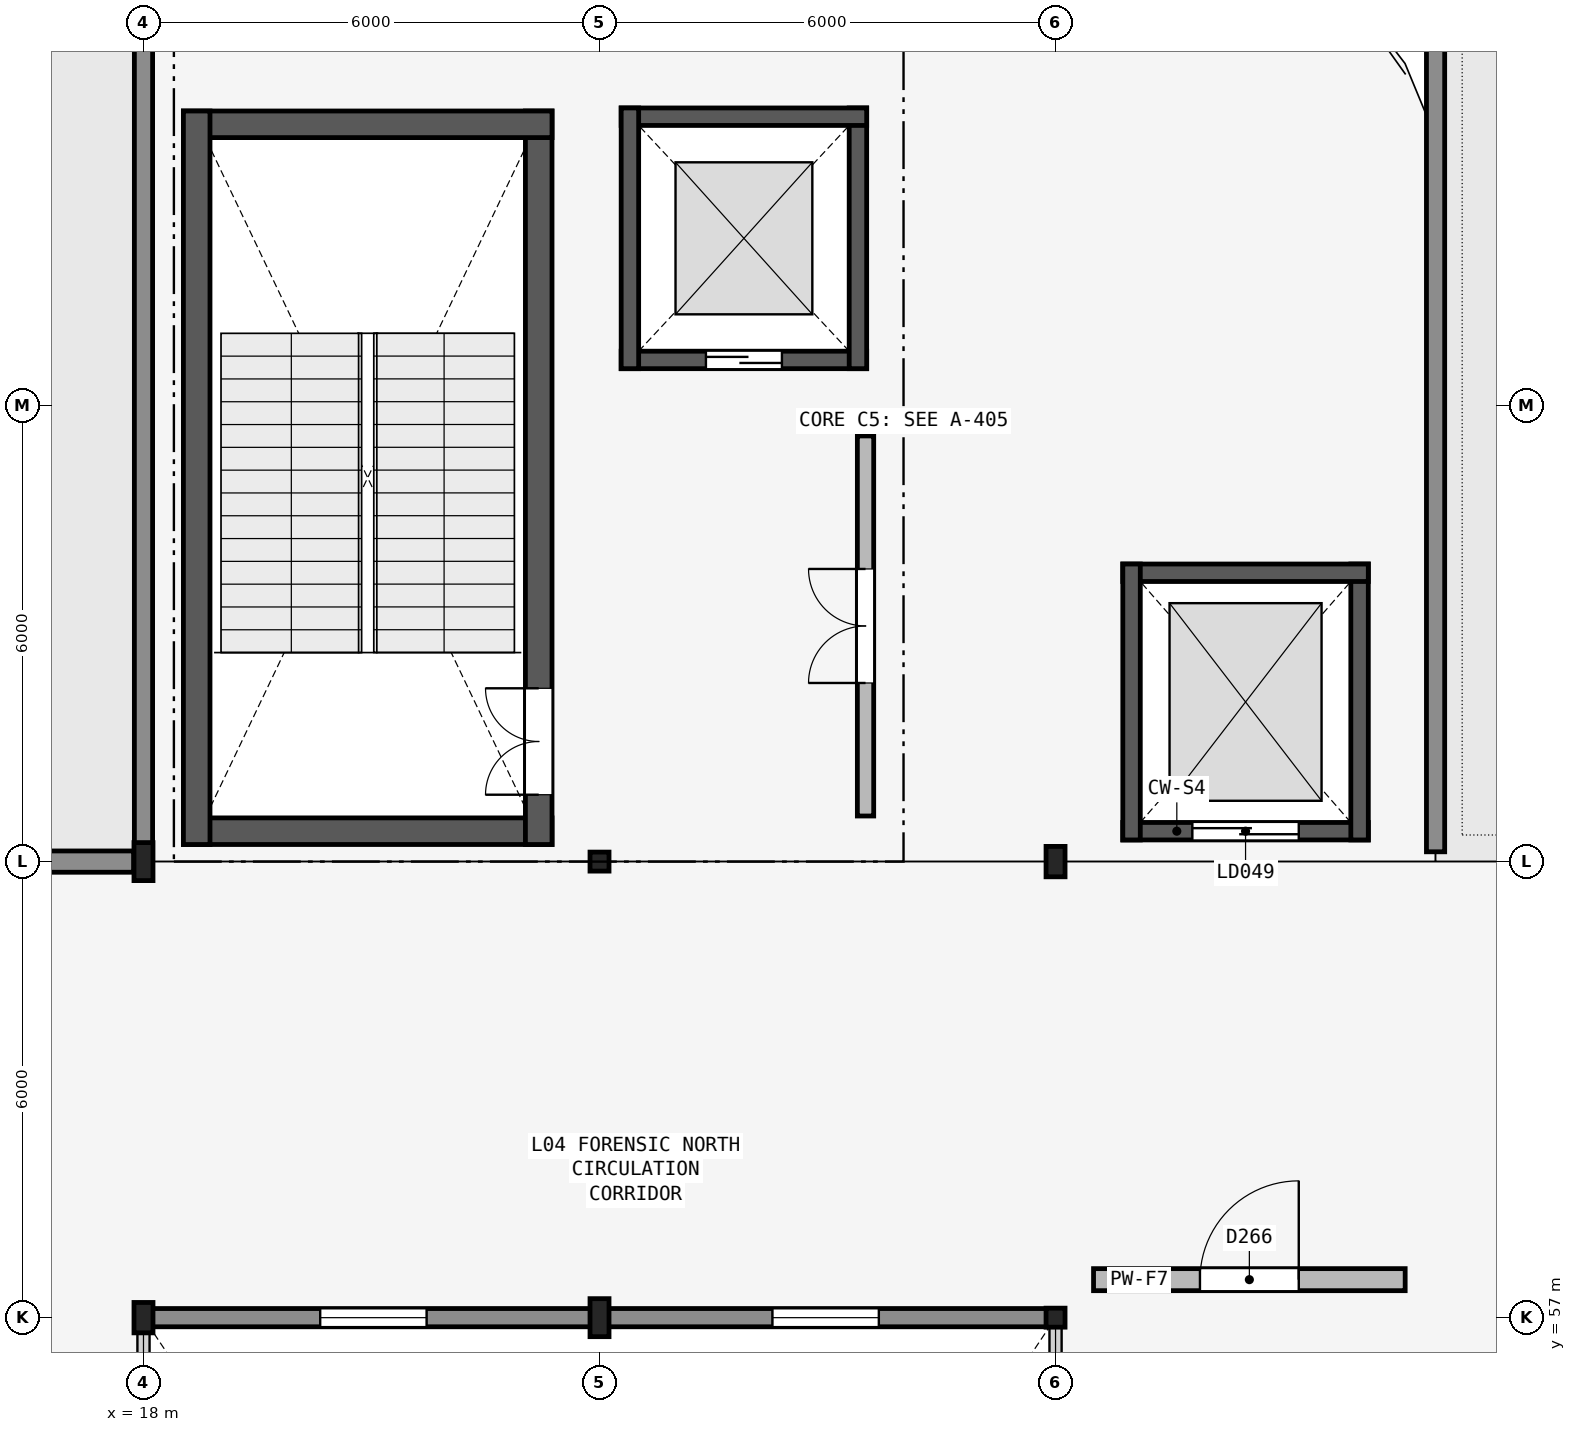
"""IFC4 building model, lengths in metres.
Left out: names, types, materials, properties, quantities, classifications, styles, units other than length and angle.
Written with IfcOpenShell. Run it as: python <this file> out.ifc"""

import sys

from ifc_helpers import new_model, si_unit, direction, frame, frame_2d, origin, origin_2d, place, context, subcontext, project, spatial, rectangle, hollow_rectangle, i_section, extrude, element, fill, save


model = new_model("IFC4")
c1 = context("Model", 3, precision=1e-05, world=origin(), true_north=direction((0.0, 1.0)))
c2 = subcontext(c1, "Body", "Model", "MODEL_VIEW")
j1 = project(units=[si_unit("LENGTHUNIT", "METRE"), si_unit("PLANEANGLEUNIT", "RADIAN")], contexts=[c1])
p1 = place(None, origin())
s1 = spatial("IfcSite", under=j1, at=p1, CompositionType="ELEMENT")
p2 = place(p1, origin())
s2 = spatial("IfcBuilding", under=s1, at=p2, CompositionType="ELEMENT")
p3 = place(p2, frame((0.0, 0.0, 18.0)))
s3 = spatial("IfcBuildingStorey", under=s2, at=p3, CompositionType="ELEMENT", Elevation=18.0)
p4 = place(p3, frame((18.0, 57.0, 0.0), z_axis=(0.0, 0.0, 1.0), x_axis=(1.0, 0.0, 0.0)))
e1 = element("IfcColumn", 1, at=p4, inside=s3, PredefinedType="COLUMN", context=c2, shape_type="SweptSolid", body=[
    extrude(i_section(OverallWidth=0.25, OverallDepth=0.4, WebThickness=0.01, FlangeThickness=0.013, FilletRadius=0.014, at=origin_2d()), origin(), (0.0, 0.0, 1.0), 4.2),
])
for number, where, z_axis, x_axis in (
    (2, (18.0, 63.0, 0.0), (0.0, 0.0, 1.0), (1.0, 0.0, 0.0)),
    (3, (24.0, 57.0, 0.0), (0.0, 0.0, 1.0), (1.0, 0.0, 0.0)),
):
    element("IfcColumn", number, at=place(p3, frame(where, z_axis=z_axis, x_axis=x_axis)), inside=s3, PredefinedType="COLUMN", context=c2, shape_type="SweptSolid", body=[
        extrude(i_section(OverallWidth=0.25, OverallDepth=0.5, WebThickness=0.01, FlangeThickness=0.015, FilletRadius=0.015, at=origin_2d()), origin(), (0.0, 0.0, 1.0), 4.2),
    ])
for number, where, z_axis, x_axis in (
    (4, (24.0, 63.0, 0.0), (0.0, 0.0, 1.0), (1.0, 0.0, 0.0)),
    (5, (30.0, 57.0, 0.0), (0.0, 0.0, 1.0), (1.0, 0.0, 0.0)),
):
    element("IfcColumn", number, at=place(p3, frame(where, z_axis=z_axis, x_axis=x_axis)), inside=s3, PredefinedType="COLUMN", context=c2, shape_type="SweptSolid", body=[
        extrude(hollow_rectangle(XDim=0.25, YDim=0.25, WallThickness=0.012, InnerFilletRadius=0.012, OuterFilletRadius=0.024, at=origin_2d()), origin(), (0.0, 0.0, 1.0), 4.2),
    ])
p5 = place(p3, frame((30.0, 63.0, 0.0), z_axis=(0.0, 0.0, 1.0), x_axis=(1.0, 0.0, 0.0)))
e6 = element("IfcColumn", 6, at=p5, inside=s3, PredefinedType="COLUMN", context=c2, shape_type="SweptSolid", body=[
    extrude(i_section(OverallWidth=0.25, OverallDepth=0.4, WebThickness=0.01, FlangeThickness=0.013, FilletRadius=0.014, at=origin_2d()), origin(), (0.0, 0.0, 1.0), 4.2),
])
p6 = place(p3, frame((12.129, 63.0, 0.0), z_axis=(0.0, 0.0, 1.0), x_axis=(1.0, 0.0, 0.0)))
e7 = element("IfcWall", 7, at=p6, inside=s3, PredefinedType="SOLIDWALL", context=c2, shape_type="SweptSolid", body=[
    extrude(rectangle(XDim=5.742, YDim=0.28, at=frame_2d((2.871, 0.0))), origin(), (0.0, 0.0, 1.0), 3.29),
])
p7 = place(p6, frame((1.971, 0.0, 0.0)))
e8 = element("IfcOpeningElement", 8, at=p7, cuts=e7, PredefinedType="OPENING", context=c2, shape_type="SweptSolid", body=[
    extrude(rectangle(XDim=1.8, YDim=2.3, at=frame_2d((0.9, 1.15))), frame((0.0, 0.15, 0.0), z_axis=(0.0, -1.0, 0.0), x_axis=(1.0, 0.0, 0.0)), (0.0, 0.0, 1.0), 0.3),
])
p8 = place(p3, frame((18.05, 57.0, 0.0), z_axis=(0.0, 0.0, 1.0), x_axis=(1.0, 0.0, 0.0)))
e9 = element("IfcWall", 9, at=p8, inside=s3, PredefinedType="SOLIDWALL", context=c2, shape_type="SweptSolid", body=[
    extrude(rectangle(XDim=5.95, YDim=0.24, at=frame_2d((2.975, 0.0))), origin(), (0.0, 0.0, 1.0), 3.29),
])
p9 = place(p8, frame((2.275, 0.0, 0.85)))
e10 = element("IfcOpeningElement", 10, at=p9, cuts=e9, PredefinedType="OPENING", context=c2, shape_type="SweptSolid", body=[
    extrude(rectangle(XDim=1.4, YDim=1.8, at=frame_2d((0.7, 0.9))), frame((0.0, 0.13, 0.0), z_axis=(0.0, -1.0, 0.0), x_axis=(1.0, 0.0, 0.0)), (0.0, 0.0, 1.0), 0.26),
])
p10 = place(p3, frame((24.0, 57.0, 0.0), z_axis=(0.0, 0.0, 1.0), x_axis=(1.0, 0.0, 0.0)))
e11 = element("IfcWall", 11, at=p10, inside=s3, PredefinedType="SOLIDWALL", context=c2, shape_type="SweptSolid", body=[
    extrude(rectangle(XDim=5.95, YDim=0.24, at=frame_2d((2.975, 0.0))), origin(), (0.0, 0.0, 1.0), 3.29),
])
p11 = place(p10, frame((2.275, 0.0, 0.85)))
e12 = element("IfcOpeningElement", 12, at=p11, cuts=e11, PredefinedType="OPENING", context=c2, shape_type="SweptSolid", body=[
    extrude(rectangle(XDim=1.4, YDim=1.8, at=frame_2d((0.7, 0.9))), frame((0.0, 0.13, 0.0), z_axis=(0.0, -1.0, 0.0), x_axis=(1.0, 0.0, 0.0)), (0.0, 0.0, 1.0), 0.26),
])
p12 = place(p3, frame((35.0, 63.129, 0.0), z_axis=(0.0, 0.0, 1.0), x_axis=(0.0, 1.0, 0.0)))
e13 = element("IfcWall", 13, at=p12, inside=s3, PredefinedType="SOLIDWALL", context=c2, shape_type="SweptSolid", body=[
    extrude(rectangle(XDim=11.746, YDim=0.24, at=frame_2d((5.873, 0.0))), origin(), (0.0, 0.0, 1.0), 3.44),
])
p13 = place(p3, frame((18.0, 63.129, 0.0), z_axis=(0.0, 0.0, 1.0), x_axis=(0.0, 1.0, 0.0)))
e14 = element("IfcWall", 14, at=p13, inside=s3, PredefinedType="SOLIDWALL", context=c2, shape_type="SweptSolid", body=[
    extrude(rectangle(XDim=11.746, YDim=0.24, at=frame_2d((5.873, 0.0))), origin(), (0.0, 0.0, 1.0), 3.29),
])
p14 = place(p3, frame((18.525, 63.4, 0.0), z_axis=(0.0, 0.0, 1.0), x_axis=(1.0, 0.0, 0.0)))
e15 = element("IfcWall", 15, at=p14, inside=s3, PredefinedType="SHEAR", context=c2, shape_type="SweptSolid", body=[
    extrude(rectangle(XDim=4.85, YDim=0.35, at=frame_2d((2.425, 0.0))), origin(), (0.0, 0.0, 1.0), 4.06),
])
p15 = place(p3, frame((23.2, 63.225, 0.0), z_axis=(0.0, 0.0, 1.0), x_axis=(0.0, 1.0, 0.0)))
e16 = element("IfcWall", 16, at=p15, inside=s3, PredefinedType="SHEAR", context=c2, shape_type="SweptSolid", body=[
    extrude(rectangle(XDim=9.65, YDim=0.35, at=frame_2d((4.825, 0.0))), origin(), (0.0, 0.0, 1.0), 4.06),
])
p16 = place(p15, frame((0.655, 0.0, 0.0)))
e17 = element("IfcOpeningElement", 17, at=p16, cuts=e16, PredefinedType="OPENING", context=c2, shape_type="SweptSolid", body=[
    extrude(rectangle(XDim=1.4, YDim=2.2, at=frame_2d((0.7, 1.1))), frame((0.0, 0.185, 0.0), z_axis=(0.0, -1.0, 0.0), x_axis=(1.0, 0.0, 0.0)), (0.0, 0.0, 1.0), 0.37),
])
p17 = place(p3, frame((23.375, 72.7, 0.0), z_axis=(0.0, 0.0, 1.0), x_axis=(-1.0, 0.0, 0.0)))
e18 = element("IfcWall", 18, at=p17, inside=s3, PredefinedType="SHEAR", context=c2, shape_type="SweptSolid", body=[
    extrude(rectangle(XDim=4.85, YDim=0.35, at=frame_2d((2.425, 0.0))), origin(), (0.0, 0.0, 1.0), 4.06),
])
p18 = place(p3, frame((18.7, 72.875, 0.0), z_axis=(0.0, 0.0, 1.0), x_axis=(0.0, -1.0, 0.0)))
e19 = element("IfcWall", 19, at=p18, inside=s3, PredefinedType="SHEAR", context=c2, shape_type="SweptSolid", body=[
    extrude(rectangle(XDim=9.65, YDim=0.35, at=frame_2d((4.825, 0.0))), origin(), (0.0, 0.0, 1.0), 4.06),
])
p19 = place(p3, frame((27.5, 63.6, 0.0), z_axis=(0.0, 0.0, 1.0), x_axis=(0.0, 1.0, 0.0)))
e20 = element("IfcWall", 20, at=p19, inside=s3, PredefinedType="PARTITIONING", context=c2, shape_type="SweptSolid", body=[
    extrude(rectangle(XDim=5.0, YDim=0.215, at=frame_2d((2.5, 0.0))), origin(), (0.0, 0.0, 1.0), 3.89),
])
p20 = place(p19, frame((1.75, 0.0, 0.0)))
e21 = element("IfcOpeningElement", 21, at=p20, cuts=e20, PredefinedType="OPENING", context=c2, shape_type="SweptSolid", body=[
    extrude(rectangle(XDim=1.5, YDim=2.15, at=frame_2d((0.75, 1.075))), frame((0.0, 0.117, 0.0), z_axis=(0.0, -1.0, 0.0), x_axis=(1.0, 0.0, 0.0)), (0.0, 0.0, 1.0), 0.235),
])
p21 = place(p3, frame((24.285, 69.6, 0.0), z_axis=(0.0, 0.0, 1.0), x_axis=(1.0, 0.0, 0.0)))
e22 = element("IfcWall", 22, at=p21, inside=s3, PredefinedType="SHEAR", context=c2, shape_type="SweptSolid", body=[
    extrude(rectangle(XDim=3.23, YDim=0.23, at=frame_2d((1.615, 0.0))), origin(), (0.0, 0.0, 1.0), 4.2),
])
p22 = place(p21, frame((1.115, 0.0, 0.0)))
e23 = element("IfcOpeningElement", 23, at=p22, cuts=e22, PredefinedType="OPENING", context=c2, shape_type="SweptSolid", body=[
    extrude(rectangle(XDim=1.0, YDim=2.15, at=frame_2d((0.5, 1.075))), frame((0.0, 0.125, 0.0), z_axis=(0.0, -1.0, 0.0), x_axis=(1.0, 0.0, 0.0)), (0.0, 0.0, 1.0), 0.25),
])
p23 = place(p3, frame((27.4, 69.485, 0.0), z_axis=(0.0, 0.0, 1.0), x_axis=(0.0, 1.0, 0.0)))
e24 = element("IfcWall", 24, at=p23, inside=s3, PredefinedType="SHEAR", context=c2, shape_type="SweptSolid", body=[
    extrude(rectangle(XDim=3.43, YDim=0.23, at=frame_2d((1.715, 0.0))), origin(), (0.0, 0.0, 1.0), 4.2),
])
p24 = place(p3, frame((27.515, 72.8, 0.0), z_axis=(0.0, 0.0, 1.0), x_axis=(-1.0, 0.0, 0.0)))
e25 = element("IfcWall", 25, at=p24, inside=s3, PredefinedType="SHEAR", context=c2, shape_type="SweptSolid", body=[
    extrude(rectangle(XDim=3.23, YDim=0.23, at=frame_2d((1.615, 0.0))), origin(), (0.0, 0.0, 1.0), 4.2),
])
p25 = place(p3, frame((24.4, 72.915, 0.0), z_axis=(0.0, 0.0, 1.0), x_axis=(0.0, -1.0, 0.0)))
e26 = element("IfcWall", 26, at=p25, inside=s3, PredefinedType="SHEAR", context=c2, shape_type="SweptSolid", body=[
    extrude(rectangle(XDim=3.43, YDim=0.23, at=frame_2d((1.715, 0.0))), origin(), (0.0, 0.0, 1.0), 4.2),
])
p26 = place(p3, frame((30.885, 63.4, 0.0), z_axis=(0.0, 0.0, 1.0), x_axis=(1.0, 0.0, 0.0)))
e27 = element("IfcWall", 27, at=p26, inside=s3, PredefinedType="SHEAR", context=c2, shape_type="SweptSolid", body=[
    extrude(rectangle(XDim=3.23, YDim=0.23, at=frame_2d((1.615, 0.0))), origin(), (0.0, 0.0, 1.0), 4.2),
])
p27 = place(p26, frame((0.915, 0.0, 0.0)))
e28 = element("IfcOpeningElement", 28, at=p27, cuts=e27, PredefinedType="OPENING", context=c2, shape_type="SweptSolid", body=[
    extrude(rectangle(XDim=1.4, YDim=2.3, at=frame_2d((0.7, 1.15))), frame((0.0, 0.125, 0.0), z_axis=(0.0, -1.0, 0.0), x_axis=(1.0, 0.0, 0.0)), (0.0, 0.0, 1.0), 0.25),
])
p28 = place(p3, frame((34.0, 63.285, 0.0), z_axis=(0.0, 0.0, 1.0), x_axis=(0.0, 1.0, 0.0)))
e29 = element("IfcWall", 29, at=p28, inside=s3, PredefinedType="SHEAR", context=c2, shape_type="SweptSolid", body=[
    extrude(rectangle(XDim=3.63, YDim=0.23, at=frame_2d((1.815, 0.0))), origin(), (0.0, 0.0, 1.0), 4.2),
])
p29 = place(p3, frame((34.115, 66.8, 0.0), z_axis=(0.0, 0.0, 1.0), x_axis=(-1.0, 0.0, 0.0)))
e30 = element("IfcWall", 30, at=p29, inside=s3, PredefinedType="SHEAR", context=c2, shape_type="SweptSolid", body=[
    extrude(rectangle(XDim=3.23, YDim=0.23, at=frame_2d((1.615, 0.0))), origin(), (0.0, 0.0, 1.0), 4.2),
])
p30 = place(p3, frame((31.0, 66.915, 0.0), z_axis=(0.0, 0.0, 1.0), x_axis=(0.0, -1.0, 0.0)))
e31 = element("IfcWall", 31, at=p30, inside=s3, PredefinedType="SHEAR", context=c2, shape_type="SweptSolid", body=[
    extrude(rectangle(XDim=3.63, YDim=0.23, at=frame_2d((1.815, 0.0))), origin(), (0.0, 0.0, 1.0), 4.2),
])
p31 = place(p3, frame((30.5, 57.5, 0.0), z_axis=(0.0, 0.0, 1.0), x_axis=(1.0, 0.0, 0.0)))
e32 = element("IfcWall", 32, at=p31, inside=s3, PredefinedType="PARTITIONING", context=c2, shape_type="SweptSolid", body=[
    extrude(rectangle(XDim=4.1, YDim=0.29, at=frame_2d((2.05, 0.0))), origin(), (0.0, 0.0, 1.0), 3.54),
])
p32 = place(p31, frame((1.4, 0.0, 0.0)))
e33 = element("IfcOpeningElement", 33, at=p32, cuts=e32, PredefinedType="OPENING", context=c2, shape_type="SweptSolid", body=[
    extrude(rectangle(XDim=1.3, YDim=2.2, at=frame_2d((0.65, 1.1))), frame((0.0, 0.155, 0.0), z_axis=(0.0, -1.0, 0.0), x_axis=(1.0, 0.0, 0.0)), (0.0, 0.0, 1.0), 0.31),
])
p33 = place(p9, origin())
e34 = element("IfcWindow", 34, at=p33, inside=s3, PartitioningType="SINGLE_PANEL", PredefinedType="WINDOW", context=c2, shape_type="SweptSolid", body=[
    extrude(rectangle(XDim=1.4, YDim=1.8, at=frame_2d((0.7, 0.9))), frame((0.0, 0.03, 0.0), z_axis=(0.0, -1.0, 0.0), x_axis=(1.0, 0.0, 0.0)), (0.0, 0.0, 1.0), 0.06),
])
fill(e10, e34)
p34 = place(p11, origin())
e35 = element("IfcWindow", 35, at=p34, inside=s3, PartitioningType="SINGLE_PANEL", PredefinedType="WINDOW", context=c2, shape_type="SweptSolid", body=[
    extrude(rectangle(XDim=1.4, YDim=1.8, at=frame_2d((0.7, 0.9))), frame((0.0, 0.03, 0.0), z_axis=(0.0, -1.0, 0.0), x_axis=(1.0, 0.0, 0.0)), (0.0, 0.0, 1.0), 0.06),
])
fill(e12, e35)
p35 = place(p16, origin())
e36 = element("IfcDoor", 36, at=p35, inside=s3, OperationType="DOUBLE_DOOR_SINGLE_SWING", PredefinedType="DOOR", context=c2, shape_type="SweptSolid", body=[
    extrude(rectangle(XDim=1.4, YDim=2.2, at=frame_2d((0.7, 1.1))), frame((0.0, 0.025, 0.0), z_axis=(0.0, -1.0, 0.0), x_axis=(1.0, 0.0, 0.0)), (0.0, 0.0, 1.0), 0.05),
])
fill(e17, e36)
p36 = place(p20, origin())
e37 = element("IfcDoor", 37, at=p36, inside=s3, OperationType="DOUBLE_DOOR_SINGLE_SWING", PredefinedType="DOOR", context=c2, shape_type="SweptSolid", body=[
    extrude(rectangle(XDim=1.5, YDim=2.15, at=frame_2d((0.75, 1.075))), frame((0.0, 0.025, 0.0), z_axis=(0.0, -1.0, 0.0), x_axis=(1.0, 0.0, 0.0)), (0.0, 0.0, 1.0), 0.05),
])
fill(e21, e37)
p37 = place(p22, origin())
e38 = element("IfcDoor", 38, at=p37, inside=s3, OperationType="SLIDING_TO_LEFT", PredefinedType="DOOR", context=c2, shape_type="SweptSolid", body=[
    extrude(rectangle(XDim=1.0, YDim=2.15, at=frame_2d((0.5, 1.075))), frame((0.0, 0.025, 0.0), z_axis=(0.0, -1.0, 0.0), x_axis=(1.0, 0.0, 0.0)), (0.0, 0.0, 1.0), 0.05),
])
fill(e23, e38)
p38 = place(p27, origin())
e39 = element("IfcDoor", 39, at=p38, inside=s3, OperationType="SLIDING_TO_LEFT", PredefinedType="DOOR", context=c2, shape_type="SweptSolid", body=[
    extrude(rectangle(XDim=1.4, YDim=2.3, at=frame_2d((0.7, 1.15))), frame((0.0, 0.025, 0.0), z_axis=(0.0, -1.0, 0.0), x_axis=(1.0, 0.0, 0.0)), (0.0, 0.0, 1.0), 0.05),
])
fill(e28, e39)
p39 = place(p32, origin())
e40 = element("IfcDoor", 40, at=p39, inside=s3, OperationType="SINGLE_SWING_RIGHT", PredefinedType="DOOR", context=c2, shape_type="SweptSolid", body=[
    extrude(rectangle(XDim=1.3, YDim=2.2, at=frame_2d((0.65, 1.1))), frame((0.0, 0.025, 0.0), z_axis=(0.0, -1.0, 0.0), x_axis=(1.0, 0.0, 0.0)), (0.0, 0.0, 1.0), 0.05),
])
fill(e33, e40)
save(model, sys.argv[1])
